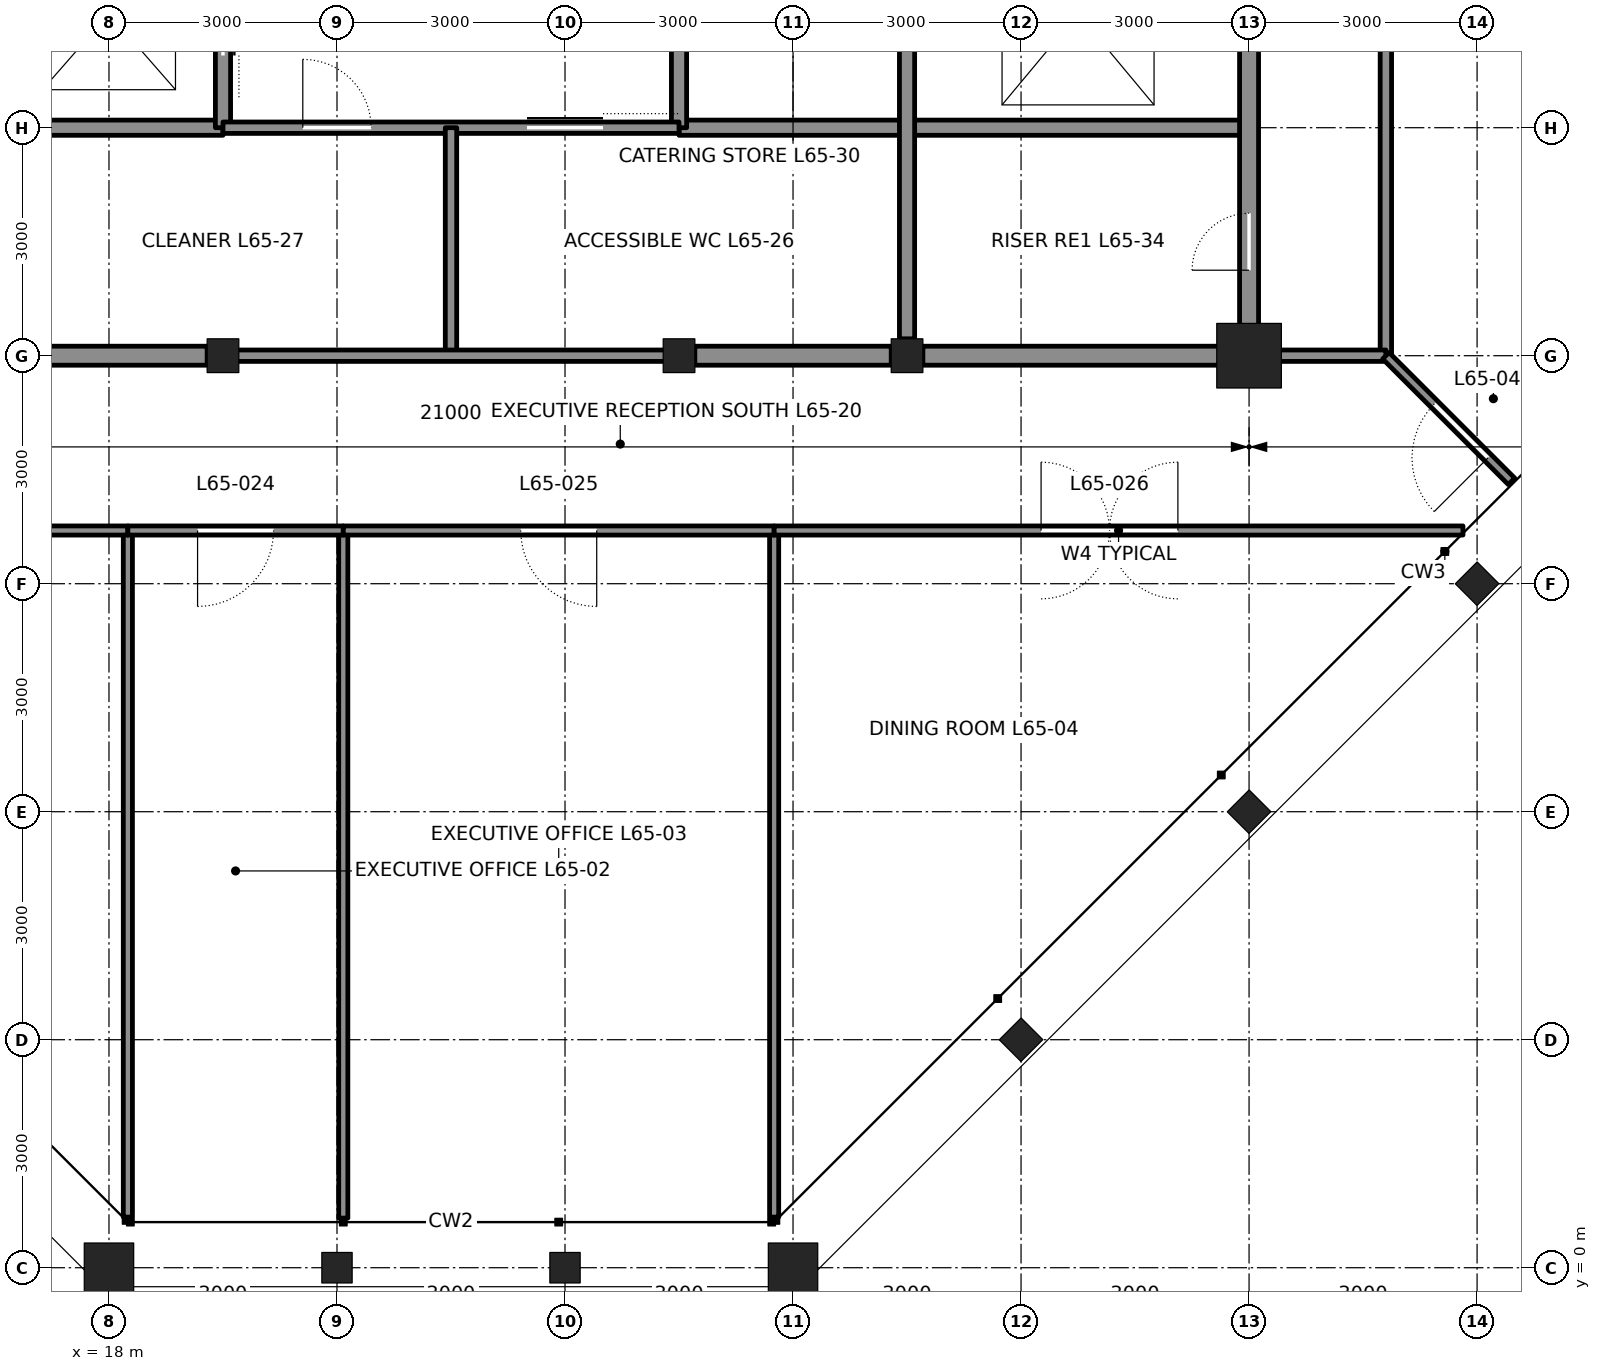
"""IFC4 building model, lengths in metres.
Left out: names, types, materials, properties, quantities, classifications, styles, units other than length and angle.
Written with IfcOpenShell. Run it as: python <this file> out.ifc"""

import sys

from ifc_helpers import new_model, si_unit, direction, frame, frame_2d, origin, origin_2d, place, context, subcontext, project, spatial, rectangle, hollow_rectangle, i_section, extrude, element, fill, save


model = new_model("IFC4")
c1 = context("Model", 3, precision=1e-05, world=origin(), true_north=direction((0.0, 1.0)))
c2 = subcontext(c1, "Body", "Model", "MODEL_VIEW")
j1 = project(units=[si_unit("LENGTHUNIT", "METRE"), si_unit("PLANEANGLEUNIT", "RADIAN")], contexts=[c1])
p1 = place(None, origin())
s1 = spatial("IfcSite", under=j1, at=p1, CompositionType="ELEMENT")
p2 = place(p1, origin())
s2 = spatial("IfcBuilding", under=s1, at=p2, CompositionType="ELEMENT")
p3 = place(p2, frame((0.0, 0.0, 291.6)))
s3 = spatial("IfcBuildingStorey", under=s2, at=p3, CompositionType="ELEMENT", Elevation=291.6)
p4 = place(p3, frame((18.0, 0.0, 0.0), z_axis=(0.0, 0.0, 1.0), x_axis=(0.0, -1.0, 0.0)))
e1 = element("IfcColumn", 1, at=p4, inside=s3, PredefinedType="COLUMN", context=c2, shape_type="SweptSolid", body=[
    extrude(hollow_rectangle(XDim=0.65, YDim=0.65, WallThickness=0.065, at=origin_2d()), origin(), (0.0, 0.0, 1.0), 4.2),
])
for number, where, z_axis, x_axis in (
    (2, (21.0, 0.0, 0.0), (0.0, 0.0, 1.0), (0.0, -1.0, 0.0)),
    (3, (24.0, 0.0, 0.0), (0.0, 0.0, 1.0), (0.0, -1.0, 0.0)),
):
    element("IfcColumn", number, at=place(p3, frame(where, z_axis=z_axis, x_axis=x_axis)), inside=s3, PredefinedType="COLUMN", context=c2, shape_type="SweptSolid", body=[
        extrude(i_section(OverallWidth=0.401, OverallDepth=0.399, WebThickness=0.025, FlangeThickness=0.04, at=origin_2d()), origin(), (0.0, 0.0, 1.0), 4.2),
    ])
p5 = place(p3, frame((27.0, 0.0, 0.0), z_axis=(0.0, 0.0, 1.0), x_axis=(0.0, -1.0, 0.0)))
e4 = element("IfcColumn", 4, at=p5, inside=s3, PredefinedType="COLUMN", context=c2, shape_type="SweptSolid", body=[
    extrude(hollow_rectangle(XDim=0.65, YDim=0.65, WallThickness=0.065, at=origin_2d()), origin(), (0.0, 0.0, 1.0), 4.2),
])
for number, where, z_axis, x_axis in (
    (5, (30.0, 3.0, 0.0), (0.0, 0.0, 1.0), (0.707, -0.707, 0.0)),
    (6, (33.0, 6.0, 0.0), (0.0, 0.0, 1.0), (0.707, -0.707, 0.0)),
    (7, (36.0, 9.0, 0.0), (0.0, 0.0, 1.0), (0.707, -0.707, 0.0)),
):
    element("IfcColumn", number, at=place(p3, frame(where, z_axis=z_axis, x_axis=x_axis)), inside=s3, PredefinedType="COLUMN", context=c2, shape_type="SweptSolid", body=[
        extrude(i_section(OverallWidth=0.404, OverallDepth=0.406, WebThickness=0.027, FlangeThickness=0.044, at=origin_2d()), origin(), (0.0, 0.0, 1.0), 4.2),
    ])
for number, where, z_axis, x_axis in (
    (8, (19.5, 12.0, 0.0), (0.0, 0.0, 1.0), (1.0, 0.0, 0.0)),
    (9, (25.5, 12.0, 0.0), (0.0, 0.0, 1.0), (1.0, 0.0, 0.0)),
    (10, (28.5, 12.0, 0.0), (0.0, 0.0, 1.0), (1.0, 0.0, 0.0)),
):
    element("IfcColumn", number, at=place(p3, frame(where, z_axis=z_axis, x_axis=x_axis)), inside=s3, PredefinedType="COLUMN", context=c2, shape_type="SweptSolid", body=[
        extrude(i_section(OverallWidth=0.417, OverallDepth=0.445, WebThickness=0.039, FlangeThickness=0.063, at=origin_2d()), origin(), (0.0, 0.0, 1.0), 4.2),
    ])
p6 = place(p3, frame((33.0, 12.0, 0.0), z_axis=(0.0, 0.0, 1.0), x_axis=(1.0, 0.0, 0.0)))
e11 = element("IfcColumn", 11, at=p6, inside=s3, PredefinedType="COLUMN", context=c2, shape_type="SweptSolid", body=[
    extrude(hollow_rectangle(XDim=0.85, YDim=0.85, WallThickness=0.085, at=origin_2d()), origin(), (0.0, 0.0, 1.0), 4.2),
])
for number, where, z_axis, x_axis in (
    (12, (16.708, 12.0, 0.0), (0.0, 0.0, 1.0), (1.0, 0.0, 0.0)),
    (13, (25.708, 12.0, 0.0), (0.0, 0.0, 1.0), (1.0, 0.0, 0.0)),
):
    element("IfcWall", number, at=place(p3, frame(where, z_axis=z_axis, x_axis=x_axis)), inside=s3, PredefinedType="SOLIDWALL", context=c2, shape_type="SweptSolid", body=[
        extrude(rectangle(XDim=2.583, YDim=0.25, at=frame_2d((1.292, 0.0))), origin(), (0.0, 0.0, 1.0), 3.181),
    ])
p7 = place(p3, frame((28.708, 12.0, 0.0), z_axis=(0.0, 0.0, 1.0), x_axis=(1.0, 0.0, 0.0)))
e14 = element("IfcWall", 14, at=p7, inside=s3, PredefinedType="SOLIDWALL", context=c2, shape_type="SweptSolid", body=[
    extrude(rectangle(XDim=4.042, YDim=0.25, at=frame_2d((2.021, 0.0))), origin(), (0.0, 0.0, 1.0), 3.181),
])
for number, where, z_axis, x_axis in (
    (15, (12.0, 15.0, 0.0), (0.0, 0.0, 1.0), (1.0, 0.0, 0.0)),
    (16, (25.5, 15.0, 0.0), (0.0, 0.0, 1.0), (1.0, 0.0, 0.0)),
):
    element("IfcWall", number, at=place(p3, frame(where, z_axis=z_axis, x_axis=x_axis)), inside=s3, PredefinedType="SOLIDWALL", context=c2, shape_type="SweptSolid", body=[
        extrude(rectangle(XDim=7.5, YDim=0.2, at=frame_2d((3.75, 0.0))), origin(), (0.0, 0.0, 1.0), 4.04),
    ])
p8 = place(p3, frame((19.5, 15.0, 0.0), z_axis=(0.0, 0.0, 1.0), x_axis=(0.0, 1.0, 0.0)))
e17 = element("IfcWall", 17, at=p8, inside=s3, PredefinedType="SOLIDWALL", context=c2, shape_type="SweptSolid", body=[
    extrude(rectangle(XDim=12.0, YDim=0.2, at=frame_2d((6.0, 0.0))), origin(), (0.0, 0.0, 1.0), 3.064),
])
p9 = place(p8, frame((0.95, 0.0, 0.0)))
e18 = element("IfcOpeningElement", 18, at=p9, cuts=e17, PredefinedType="OPENING", context=c2, shape_type="SweptSolid", body=[
    extrude(rectangle(XDim=1.1, YDim=2.1, at=frame_2d((0.55, 1.05))), frame((0.0, 0.11, 0.0), z_axis=(0.0, -1.0, 0.0), x_axis=(1.0, 0.0, 0.0)), (0.0, 0.0, 1.0), 0.22),
])
p10 = place(p8, frame((3.95, 0.0, 0.0)))
e19 = element("IfcOpeningElement", 19, at=p10, cuts=e17, PredefinedType="OPENING", context=c2, shape_type="SweptSolid", body=[
    extrude(rectangle(XDim=1.1, YDim=2.1, at=frame_2d((0.55, 1.05))), frame((0.0, 0.11, 0.0), z_axis=(0.0, -1.0, 0.0), x_axis=(1.0, 0.0, 0.0)), (0.0, 0.0, 1.0), 0.22),
])
p11 = place(p8, frame((6.95, 0.0, 0.0)))
e20 = element("IfcOpeningElement", 20, at=p11, cuts=e17, PredefinedType="OPENING", context=c2, shape_type="SweptSolid", body=[
    extrude(rectangle(XDim=1.1, YDim=2.1, at=frame_2d((0.55, 1.05))), frame((0.0, 0.11, 0.0), z_axis=(0.0, -1.0, 0.0), x_axis=(1.0, 0.0, 0.0)), (0.0, 0.0, 1.0), 0.22),
])
p12 = place(p8, frame((9.95, 0.0, 0.0)))
e21 = element("IfcOpeningElement", 21, at=p12, cuts=e17, PredefinedType="OPENING", context=c2, shape_type="SweptSolid", body=[
    extrude(rectangle(XDim=1.1, YDim=2.1, at=frame_2d((0.55, 1.05))), frame((0.0, 0.11, 0.0), z_axis=(0.0, -1.0, 0.0), x_axis=(1.0, 0.0, 0.0)), (0.0, 0.0, 1.0), 0.22),
])
p13 = place(p3, frame((25.5, 15.0, 0.0), z_axis=(0.0, 0.0, 1.0), x_axis=(0.0, 1.0, 0.0)))
e22 = element("IfcWall", 22, at=p13, inside=s3, PredefinedType="SOLIDWALL", context=c2, shape_type="SweptSolid", body=[
    extrude(rectangle(XDim=12.0, YDim=0.2, at=frame_2d((6.0, 0.0))), origin(), (0.0, 0.0, 1.0), 3.064),
])
p14 = place(p13, frame((1.8, 0.0, 0.0)))
e23 = element("IfcOpeningElement", 23, at=p14, cuts=e22, PredefinedType="OPENING", context=c2, shape_type="SweptSolid", body=[
    extrude(rectangle(XDim=0.9, YDim=2.1, at=frame_2d((0.45, 1.05))), frame((0.0, 0.11, 0.0), z_axis=(0.0, -1.0, 0.0), x_axis=(1.0, 0.0, 0.0)), (0.0, 0.0, 1.0), 0.22),
])
p15 = place(p13, frame((4.8, 0.0, 0.0)))
e24 = element("IfcOpeningElement", 24, at=p15, cuts=e22, PredefinedType="OPENING", context=c2, shape_type="SweptSolid", body=[
    extrude(rectangle(XDim=0.9, YDim=2.1, at=frame_2d((0.45, 1.05))), frame((0.0, 0.11, 0.0), z_axis=(0.0, -1.0, 0.0), x_axis=(1.0, 0.0, 0.0)), (0.0, 0.0, 1.0), 0.22),
])
p16 = place(p3, frame((28.5, 12.222, 0.0), z_axis=(0.0, 0.0, 1.0), x_axis=(0.0, 1.0, 0.0)))
e25 = element("IfcWall", 25, at=p16, inside=s3, PredefinedType="SOLIDWALL", context=c2, shape_type="SweptSolid", body=[
    extrude(rectangle(XDim=8.555, YDim=0.2, at=frame_2d((4.278, 0.0))), origin(), (0.0, 0.0, 1.0), 3.113),
])
p17 = place(p3, frame((33.0, 12.25, 0.0), z_axis=(0.0, 0.0, 1.0), x_axis=(0.0, 1.0, 0.0)))
e26 = element("IfcWall", 26, at=p17, inside=s3, PredefinedType="SOLIDWALL", context=c2, shape_type="SweptSolid", body=[
    extrude(rectangle(XDim=8.528, YDim=0.25, at=frame_2d((4.264, 0.0))), origin(), (0.0, 0.0, 1.0), 3.113),
])
p18 = place(p17, frame((6.65, 0.0, 0.0)))
e27 = element("IfcOpeningElement", 27, at=p18, cuts=e26, PredefinedType="OPENING", context=c2, shape_type="SweptSolid", body=[
    extrude(rectangle(XDim=1.2, YDim=2.1, at=frame_2d((0.6, 1.05))), frame((0.0, 0.135, 0.0), z_axis=(0.0, -1.0, 0.0), x_axis=(1.0, 0.0, 0.0)), (0.0, 0.0, 1.0), 0.27),
])
p19 = place(p17, frame((0.875, 0.0, 0.0)))
e28 = element("IfcOpeningElement", 28, at=p19, cuts=e26, PredefinedType="OPENING", context=c2, shape_type="SweptSolid", body=[
    extrude(rectangle(XDim=0.75, YDim=2.1, at=frame_2d((0.375, 1.05))), frame((0.0, 0.135, 0.0), z_axis=(0.0, -1.0, 0.0), x_axis=(1.0, 0.0, 0.0)), (0.0, 0.0, 1.0), 0.27),
])
p20 = place(p3, frame((19.5, 15.0, 0.0), z_axis=(0.0, 0.0, 1.0), x_axis=(1.0, 0.0, 0.0)))
e29 = element("IfcWall", 29, at=p20, inside=s3, PredefinedType="PARTITIONING", context=c2, shape_type="SweptSolid", body=[
    extrude(rectangle(XDim=6.0, YDim=0.15, at=frame_2d((3.0, 0.0))), origin(), (0.0, 0.0, 1.0), 4.04),
])
p21 = place(p20, frame((4.0, 0.0, 0.0)))
e30 = element("IfcOpeningElement", 30, at=p21, cuts=e29, PredefinedType="OPENING", context=c2, shape_type="SweptSolid", body=[
    extrude(rectangle(XDim=1.0, YDim=2.1, at=frame_2d((0.5, 1.05))), frame((0.0, 0.085, 0.0), z_axis=(0.0, -1.0, 0.0), x_axis=(1.0, 0.0, 0.0)), (0.0, 0.0, 1.0), 0.17),
])
p22 = place(p20, frame((1.05, 0.0, 0.0)))
e31 = element("IfcOpeningElement", 31, at=p22, cuts=e29, PredefinedType="OPENING", context=c2, shape_type="SweptSolid", body=[
    extrude(rectangle(XDim=0.9, YDim=2.1, at=frame_2d((0.45, 1.05))), frame((0.0, 0.085, 0.0), z_axis=(0.0, -1.0, 0.0), x_axis=(1.0, 0.0, 0.0)), (0.0, 0.0, 1.0), 0.17),
])
p23 = place(p3, frame((22.5, 15.0, 0.0), z_axis=(0.0, 0.0, 1.0), x_axis=(0.0, -1.0, 0.0)))
e32 = element("IfcWall", 32, at=p23, inside=s3, PredefinedType="PARTITIONING", context=c2, shape_type="SweptSolid", body=[
    extrude(rectangle(XDim=3.0, YDim=0.15, at=frame_2d((1.5, 0.0))), origin(), (0.0, 0.0, 1.0), 4.04),
])
p24 = place(p3, frame((19.5, 12.0, 0.0), z_axis=(0.0, 0.0, 1.0), x_axis=(1.0, 0.0, 0.0)))
e33 = element("IfcWall", 33, at=p24, inside=s3, PredefinedType="PARTITIONING", context=c2, shape_type="SweptSolid", body=[
    extrude(rectangle(XDim=6.0, YDim=0.15, at=frame_2d((3.0, 0.0))), origin(), (0.0, 0.0, 1.0), 3.181),
])
p25 = place(p3, frame((18.249, 0.666, 0.0), z_axis=(0.0, 0.0, 1.0), x_axis=(0.0, 1.0, 0.0)))
e34 = element("IfcWall", 34, at=p25, inside=s3, PredefinedType="PARTITIONING", context=c2, shape_type="SweptSolid", body=[
    extrude(rectangle(XDim=9.034, YDim=0.12, at=frame_2d((4.517, 0.0))), origin(), (0.0, 0.0, 1.0), 4.04),
])
p26 = place(p3, frame((21.083, 0.653, 0.0), z_axis=(0.0, 0.0, 1.0), x_axis=(0.0, 1.0, 0.0)))
e35 = element("IfcWall", 35, at=p26, inside=s3, PredefinedType="PARTITIONING", context=c2, shape_type="SweptSolid", body=[
    extrude(rectangle(XDim=9.047, YDim=0.12, at=frame_2d((4.524, 0.0))), origin(), (0.0, 0.0, 1.0), 3.357),
])
p27 = place(p3, frame((26.751, 0.666, 0.0), z_axis=(0.0, 0.0, 1.0), x_axis=(0.0, 1.0, 0.0)))
e36 = element("IfcWall", 36, at=p27, inside=s3, PredefinedType="PARTITIONING", context=c2, shape_type="SweptSolid", body=[
    extrude(rectangle(XDim=9.034, YDim=0.12, at=frame_2d((4.517, 0.0))), origin(), (0.0, 0.0, 1.0), 4.04),
])
p28 = place(p3, frame((9.186, 9.7, 0.0), z_axis=(0.0, 0.0, 1.0), x_axis=(1.0, 0.0, 0.0)))
e37 = element("IfcWall", 37, at=p28, inside=s3, PredefinedType="PARTITIONING", context=c2, shape_type="SweptSolid", body=[
    extrude(rectangle(XDim=9.063, YDim=0.12, at=frame_2d((4.531, 0.0))), origin(), (0.0, 0.0, 1.0), 4.04),
])
p29 = place(p28, frame((3.512, 0.0, 0.0)))
e38 = element("IfcOpeningElement", 38, at=p29, cuts=e37, PredefinedType="OPENING", context=c2, shape_type="SweptSolid", body=[
    extrude(rectangle(XDim=1.8, YDim=2.4, at=frame_2d((0.9, 1.2))), frame((0.0, 0.07, 0.0), z_axis=(0.0, -1.0, 0.0), x_axis=(1.0, 0.0, 0.0)), (0.0, 0.0, 1.0), 0.14),
])
p30 = place(p3, frame((18.249, 9.7, 0.0), z_axis=(0.0, 0.0, 1.0), x_axis=(1.0, 0.0, 0.0)))
e39 = element("IfcWall", 39, at=p30, inside=s3, PredefinedType="PARTITIONING", context=c2, shape_type="SweptSolid", body=[
    extrude(rectangle(XDim=2.834, YDim=0.12, at=frame_2d((1.417, 0.0))), origin(), (0.0, 0.0, 1.0), 4.04),
])
p31 = place(p30, frame((0.917, 0.0, 0.0)))
e40 = element("IfcOpeningElement", 40, at=p31, cuts=e39, PredefinedType="OPENING", context=c2, shape_type="SweptSolid", body=[
    extrude(rectangle(XDim=1.0, YDim=2.4, at=frame_2d((0.5, 1.2))), frame((0.0, 0.07, 0.0), z_axis=(0.0, -1.0, 0.0), x_axis=(1.0, 0.0, 0.0)), (0.0, 0.0, 1.0), 0.14),
])
p32 = place(p3, frame((21.083, 9.7, 0.0), z_axis=(0.0, 0.0, 1.0), x_axis=(1.0, 0.0, 0.0)))
e41 = element("IfcWall", 41, at=p32, inside=s3, PredefinedType="PARTITIONING", context=c2, shape_type="SweptSolid", body=[
    extrude(rectangle(XDim=5.669, YDim=0.12, at=frame_2d((2.834, 0.0))), origin(), (0.0, 0.0, 1.0), 4.04),
])
p33 = place(p32, frame((2.334, 0.0, 0.0)))
e42 = element("IfcOpeningElement", 42, at=p33, cuts=e41, PredefinedType="OPENING", context=c2, shape_type="SweptSolid", body=[
    extrude(rectangle(XDim=1.0, YDim=2.4, at=frame_2d((0.5, 1.2))), frame((0.0, 0.07, 0.0), z_axis=(0.0, -1.0, 0.0), x_axis=(1.0, 0.0, 0.0)), (0.0, 0.0, 1.0), 0.14),
])
p34 = place(p3, frame((26.751, 9.7, 0.0), z_axis=(0.0, 0.0, 1.0), x_axis=(1.0, 0.0, 0.0)))
e43 = element("IfcWall", 43, at=p34, inside=s3, PredefinedType="PARTITIONING", context=c2, shape_type="SweptSolid", body=[
    extrude(rectangle(XDim=9.063, YDim=0.12, at=frame_2d((4.531, 0.0))), origin(), (0.0, 0.0, 1.0), 4.04),
])
p35 = place(p34, frame((3.512, 0.0, 0.0)))
e44 = element("IfcOpeningElement", 44, at=p35, cuts=e43, PredefinedType="OPENING", context=c2, shape_type="SweptSolid", body=[
    extrude(rectangle(XDim=1.8, YDim=2.4, at=frame_2d((0.9, 1.2))), frame((0.0, 0.07, 0.0), z_axis=(0.0, -1.0, 0.0), x_axis=(1.0, 0.0, 0.0)), (0.0, 0.0, 1.0), 0.14),
])
p36 = place(p3, frame((34.8, 12.0, 0.0), z_axis=(0.0, 0.0, 1.0), x_axis=(0.0, 1.0, 0.0)))
e45 = element("IfcWall", 45, at=p36, inside=s3, PredefinedType="PARTITIONING", context=c2, shape_type="SweptSolid", body=[
    extrude(rectangle(XDim=24.314, YDim=0.15, at=frame_2d((12.157, 0.0))), origin(), (0.0, 0.0, 1.0), 4.04),
])
p37 = place(p36, frame((11.5, 0.0, 0.0)))
e46 = element("IfcOpeningElement", 46, at=p37, cuts=e45, PredefinedType="OPENING", context=c2, shape_type="SweptSolid", body=[
    extrude(rectangle(XDim=1.0, YDim=2.4, at=frame_2d((0.5, 1.2))), frame((0.0, 0.085, 0.0), z_axis=(0.0, -1.0, 0.0), x_axis=(1.0, 0.0, 0.0)), (0.0, 0.0, 1.0), 0.17),
])
p38 = place(p3, frame((33.0, 12.0, 0.0), z_axis=(0.0, 0.0, 1.0), x_axis=(1.0, 0.0, 0.0)))
e47 = element("IfcWall", 47, at=p38, inside=s3, PredefinedType="PARTITIONING", context=c2, shape_type="SweptSolid", body=[
    extrude(rectangle(XDim=1.8, YDim=0.15, at=frame_2d((0.9, 0.0))), origin(), (0.0, 0.0, 1.0), 3.27),
])
p39 = place(p3, frame((34.8, 12.0, 0.0), z_axis=(0.0, 0.0, 1.0), x_axis=(0.707106781187, -0.707106781187, 0.0)))
e48 = element("IfcWall", 48, at=p39, inside=s3, PredefinedType="PARTITIONING", context=c2, shape_type="SweptSolid", body=[
    extrude(rectangle(XDim=2.338, YDim=0.12, at=frame_2d((1.169, 0.0))), origin(), (0.0, 0.0, 1.0), 4.04),
])
p40 = place(p39, frame((0.9, 0.0, 0.0)))
e49 = element("IfcOpeningElement", 49, at=p40, cuts=e48, PredefinedType="OPENING", context=c2, shape_type="SweptSolid", body=[
    extrude(rectangle(XDim=1.0, YDim=2.4, at=frame_2d((0.5, 1.2))), frame((0.0, 0.07, 0.0), z_axis=(0.0, -1.0, 0.0), x_axis=(1.0, 0.0, 0.0)), (0.0, 0.0, 1.0), 0.14),
])
p41 = place(p19, origin())
e50 = element("IfcDoor", 50, at=p41, inside=s3, OperationType="SINGLE_SWING_LEFT", PredefinedType="DOOR", context=c2, shape_type="SweptSolid", body=[
    extrude(rectangle(XDim=0.75, YDim=2.1, at=frame_2d((0.375, 1.05))), frame((0.0, 0.025, 0.0), z_axis=(0.0, -1.0, 0.0), x_axis=(1.0, 0.0, 0.0)), (0.0, 0.0, 1.0), 0.05),
])
fill(e28, e50)
p42 = place(p21, origin())
e51 = element("IfcDoor", 51, at=p42, inside=s3, OperationType="SLIDING_TO_LEFT", PredefinedType="DOOR", context=c2, shape_type="SweptSolid", body=[
    extrude(rectangle(XDim=1.0, YDim=2.1, at=frame_2d((0.5, 1.05))), frame((0.0, 0.025, 0.0), z_axis=(0.0, -1.0, 0.0), x_axis=(1.0, 0.0, 0.0)), (0.0, 0.0, 1.0), 0.05),
])
fill(e30, e51)
p43 = place(p22, origin())
e52 = element("IfcDoor", 52, at=p43, inside=s3, OperationType="SINGLE_SWING_LEFT", PredefinedType="DOOR", context=c2, shape_type="SweptSolid", body=[
    extrude(rectangle(XDim=0.9, YDim=2.1, at=frame_2d((0.45, 1.05))), frame((0.0, 0.025, 0.0), z_axis=(0.0, -1.0, 0.0), x_axis=(1.0, 0.0, 0.0)), (0.0, 0.0, 1.0), 0.05),
])
fill(e31, e52)
p44 = place(p9, origin())
e53 = element("IfcDoor", 53, at=p44, inside=s3, OperationType="DOUBLE_DOOR_SLIDING", PredefinedType="DOOR", context=c2, shape_type="SweptSolid", body=[
    extrude(rectangle(XDim=1.1, YDim=2.1, at=frame_2d((0.55, 1.05))), frame((0.0, 0.025, 0.0), z_axis=(0.0, -1.0, 0.0), x_axis=(1.0, 0.0, 0.0)), (0.0, 0.0, 1.0), 0.05),
])
fill(e18, e53)
p45 = place(p31, frame((1.0, 0.0, 0.0), z_axis=(0.0, 0.0, 1.0), x_axis=(-1.0, 0.0, 0.0)))
e54 = element("IfcDoor", 54, at=p45, inside=s3, OperationType="SINGLE_SWING_RIGHT", PredefinedType="DOOR", context=c2, shape_type="SweptSolid", body=[
    extrude(rectangle(XDim=1.0, YDim=2.4, at=frame_2d((0.5, 1.2))), frame((0.0, 0.025, 0.0), z_axis=(0.0, -1.0, 0.0), x_axis=(1.0, 0.0, 0.0)), (0.0, 0.0, 1.0), 0.05),
])
fill(e40, e54)
p46 = place(p33, frame((1.0, 0.0, 0.0), z_axis=(0.0, 0.0, 1.0), x_axis=(-1.0, 0.0, 0.0)))
e55 = element("IfcDoor", 55, at=p46, inside=s3, OperationType="SINGLE_SWING_LEFT", PredefinedType="DOOR", context=c2, shape_type="SweptSolid", body=[
    extrude(rectangle(XDim=1.0, YDim=2.4, at=frame_2d((0.5, 1.2))), frame((0.0, 0.025, 0.0), z_axis=(0.0, -1.0, 0.0), x_axis=(1.0, 0.0, 0.0)), (0.0, 0.0, 1.0), 0.05),
])
fill(e42, e55)
p47 = place(p35, origin())
e56 = element("IfcDoor", 56, at=p47, inside=s3, OperationType="DOUBLE_DOOR_DOUBLE_SWING", PredefinedType="DOOR", context=c2, shape_type="SweptSolid", body=[
    extrude(rectangle(XDim=1.8, YDim=2.4, at=frame_2d((0.9, 1.2))), frame((0.0, 0.025, 0.0), z_axis=(0.0, -1.0, 0.0), x_axis=(1.0, 0.0, 0.0)), (0.0, 0.0, 1.0), 0.05),
])
fill(e44, e56)
p48 = place(p40, frame((1.0, 0.0, 0.0), z_axis=(0.0, 0.0, 1.0), x_axis=(-1.0, 0.0, 0.0)))
e57 = element("IfcDoor", 57, at=p48, inside=s3, OperationType="SINGLE_SWING_LEFT", PredefinedType="DOOR", context=c2, shape_type="SweptSolid", body=[
    extrude(rectangle(XDim=1.0, YDim=2.4, at=frame_2d((0.5, 1.2))), frame((0.0, 0.025, 0.0), z_axis=(0.0, -1.0, 0.0), x_axis=(1.0, 0.0, 0.0)), (0.0, 0.0, 1.0), 0.05),
])
fill(e49, e57)
save(model, sys.argv[1])
